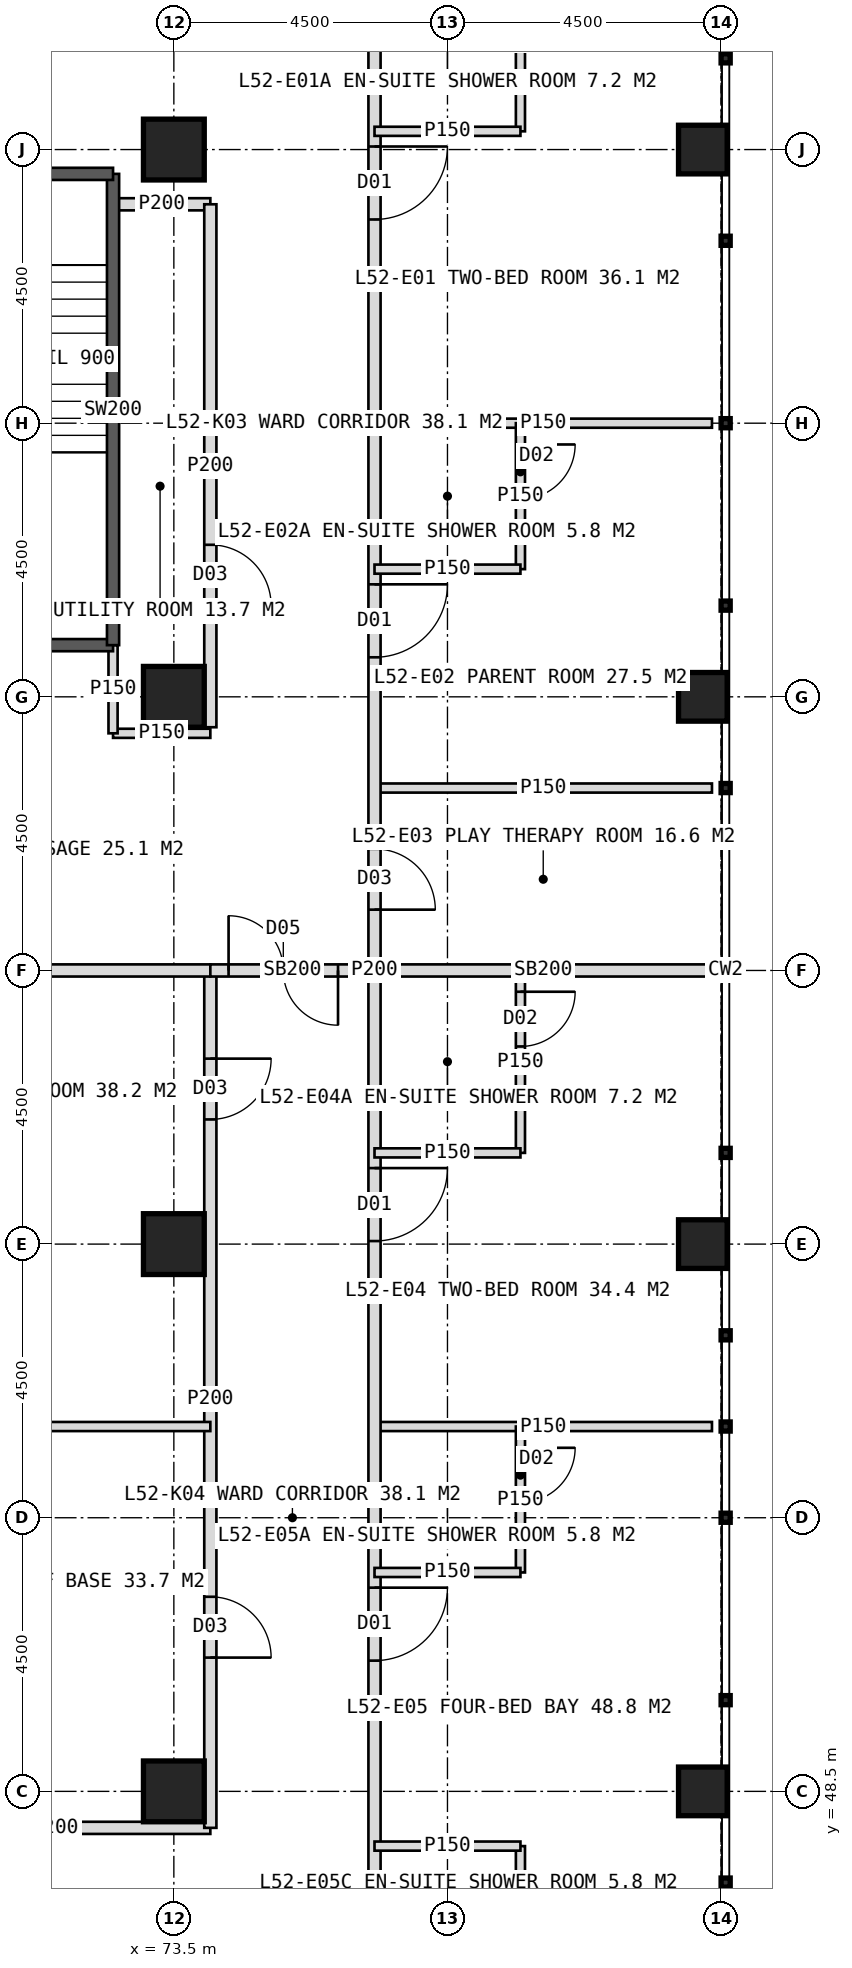
"""IFC4 building model, lengths in metres.
Left out: names, types, materials, properties, quantities, classifications, styles, units other than length and angle.
Written with IfcOpenShell. Run it as: python <this file> out.ifc"""

import sys

from ifc_helpers import new_model, si_unit, direction, frame, frame_2d, origin, origin_2d, place, context, subcontext, project, spatial, rectangle, hollow_rectangle, extrude, element, fill, save


model = new_model("IFC4")
c1 = context("Model", 3, precision=1e-05, world=origin(), true_north=direction((0.0, 1.0)))
c2 = subcontext(c1, "Body", "Model", "MODEL_VIEW")
j1 = project(units=[si_unit("LENGTHUNIT", "METRE"), si_unit("PLANEANGLEUNIT", "RADIAN")], contexts=[c1])
p1 = place(None, origin())
s1 = spatial("IfcSite", under=j1, at=p1, CompositionType="ELEMENT")
p2 = place(p1, origin())
s2 = spatial("IfcBuilding", under=s1, at=p2, CompositionType="ELEMENT")
p3 = place(p2, frame((0.0, 0.0, 217.0)))
s3 = spatial("IfcBuildingStorey", under=s2, at=p3, CompositionType="ELEMENT", Elevation=217.0)
for number, where, z_axis, x_axis in (
    (1, (73.5, 48.5, 0.0), (0.0, 0.0, 1.0), (1.0, 0.0, 0.0)),
    (2, (73.5, 75.5, 0.0), (0.0, 0.0, 1.0), (1.0, 0.0, 0.0)),
    (3, (73.5, 57.5, 0.0), (0.0, 0.0, 1.0), (1.0, 0.0, 0.0)),
    (4, (73.5, 66.5, 0.0), (0.0, 0.0, 1.0), (1.0, 0.0, 0.0)),
):
    element("IfcColumn", number, at=place(p3, frame(where, z_axis=z_axis, x_axis=x_axis)), inside=s3, PredefinedType="COLUMN", context=c2, shape_type="SweptSolid", body=[
        extrude(hollow_rectangle(XDim=1.0, YDim=1.0, WallThickness=0.1, at=origin_2d()), origin(), (0.0, 0.0, 1.0), 4.0),
    ])
for number, where, z_axis, x_axis in (
    (5, (82.2, 48.5, 0.0), (0.0, 0.0, 1.0), (1.0, 0.0, 0.0)),
    (6, (82.2, 57.5, 0.0), (0.0, 0.0, 1.0), (1.0, 0.0, 0.0)),
    (7, (82.2, 66.5, 0.0), (0.0, 0.0, 1.0), (1.0, 0.0, 0.0)),
    (8, (82.2, 75.5, 0.0), (0.0, 0.0, 1.0), (1.0, 0.0, 0.0)),
):
    element("IfcColumn", number, at=place(p3, frame(where, z_axis=z_axis, x_axis=x_axis)), inside=s3, PredefinedType="COLUMN", context=c2, shape_type="SweptSolid", body=[
        extrude(hollow_rectangle(XDim=0.8, YDim=0.8, WallThickness=0.08, at=origin_2d()), origin(), (0.0, 0.0, 1.0), 4.0),
    ])
p4 = place(p3, frame((72.5, 74.6, 0.0), z_axis=(0.0, 0.0, 1.0), x_axis=(1.0, 0.0, 0.0)))
e9 = element("IfcWall", 9, at=p4, inside=s3, PredefinedType="PARTITIONING", context=c2, shape_type="SweptSolid", body=[
    extrude(rectangle(XDim=1.6, YDim=0.2, at=frame_2d((0.8, 0.0))), origin(), (0.0, 0.0, 1.0), 3.75),
])
p5 = place(p3, frame((74.1, 47.9, 0.0), z_axis=(0.0, 0.0, 1.0), x_axis=(-1.0, 0.0, 0.0)))
e10 = element("IfcWall", 10, at=p5, inside=s3, PredefinedType="PARTITIONING", context=c2, shape_type="SweptSolid", body=[
    extrude(rectangle(XDim=5.1, YDim=0.2, at=frame_2d((2.55, 0.0))), origin(), (0.0, 0.0, 1.0), 3.75),
])
for number, where, z_axis, x_axis in (
    (11, (76.8, 71.0, 0.0), (0.0, 0.0, 1.0), (1.0, 0.0, 0.0)),
    (12, (76.8, 65.0, 0.0), (0.0, 0.0, 1.0), (1.0, 0.0, 0.0)),
):
    element("IfcWall", number, at=place(p3, frame(where, z_axis=z_axis, x_axis=x_axis)), inside=s3, PredefinedType="PARTITIONING", context=c2, shape_type="SweptSolid", body=[
        extrude(rectangle(XDim=5.55, YDim=0.15, at=frame_2d((2.775, 0.0))), origin(), (0.0, 0.0, 1.0), 3.75),
    ])
p6 = place(p3, frame((76.8, 62.0, 0.0), z_axis=(0.0, 0.0, 1.0), x_axis=(1.0, 0.0, 0.0)))
e13 = element("IfcWall", 13, at=p6, inside=s3, PredefinedType="SOLIDWALL", context=c2, shape_type="SweptSolid", body=[
    extrude(rectangle(XDim=5.55, YDim=0.2, at=frame_2d((2.775, 0.0))), origin(), (0.0, 0.0, 1.0), 2.95),
])
p7 = place(p3, frame((76.8, 54.5, 0.0), z_axis=(0.0, 0.0, 1.0), x_axis=(1.0, 0.0, 0.0)))
e14 = element("IfcWall", 14, at=p7, inside=s3, PredefinedType="PARTITIONING", context=c2, shape_type="SweptSolid", body=[
    extrude(rectangle(XDim=5.55, YDim=0.15, at=frame_2d((2.775, 0.0))), origin(), (0.0, 0.0, 1.0), 3.75),
])
p8 = place(p3, frame((76.8, 78.8, 0.0), z_axis=(0.0, 0.0, 1.0), x_axis=(0.0, -1.0, 0.0)))
e15 = element("IfcWall", 15, at=p8, inside=s3, PredefinedType="PARTITIONING", context=c2, shape_type="SweptSolid", body=[
    extrude(rectangle(XDim=33.6, YDim=0.2, at=frame_2d((16.8, 0.0))), origin(), (0.0, 0.0, 1.0), 3.75),
])
p9 = place(p8, frame((3.25, 0.0, 0.0)))
e16 = element("IfcOpeningElement", 16, at=p9, cuts=e15, PredefinedType="OPENING", context=c2, shape_type="SweptSolid", body=[
    extrude(rectangle(XDim=1.2, YDim=2.2, at=frame_2d((0.6, 1.1))), frame((0.0, 0.11, 0.0), z_axis=(0.0, -1.0, 0.0), x_axis=(1.0, 0.0, 0.0)), (0.0, 0.0, 1.0), 0.22),
])
p10 = place(p8, frame((10.45, 0.0, 0.0)))
e17 = element("IfcOpeningElement", 17, at=p10, cuts=e15, PredefinedType="OPENING", context=c2, shape_type="SweptSolid", body=[
    extrude(rectangle(XDim=1.2, YDim=2.2, at=frame_2d((0.6, 1.1))), frame((0.0, 0.11, 0.0), z_axis=(0.0, -1.0, 0.0), x_axis=(1.0, 0.0, 0.0)), (0.0, 0.0, 1.0), 0.22),
])
p11 = place(p8, frame((14.8, 0.0, 0.0)))
e18 = element("IfcOpeningElement", 18, at=p11, cuts=e15, PredefinedType="OPENING", context=c2, shape_type="SweptSolid", body=[
    extrude(rectangle(XDim=1.0, YDim=2.1, at=frame_2d((0.5, 1.05))), frame((0.0, 0.11, 0.0), z_axis=(0.0, -1.0, 0.0), x_axis=(1.0, 0.0, 0.0)), (0.0, 0.0, 1.0), 0.22),
])
p12 = place(p8, frame((20.05, 0.0, 0.0)))
e19 = element("IfcOpeningElement", 19, at=p12, cuts=e15, PredefinedType="OPENING", context=c2, shape_type="SweptSolid", body=[
    extrude(rectangle(XDim=1.2, YDim=2.2, at=frame_2d((0.6, 1.1))), frame((0.0, 0.11, 0.0), z_axis=(0.0, -1.0, 0.0), x_axis=(1.0, 0.0, 0.0)), (0.0, 0.0, 1.0), 0.22),
])
p13 = place(p8, frame((26.95, 0.0, 0.0)))
e20 = element("IfcOpeningElement", 20, at=p13, cuts=e15, PredefinedType="OPENING", context=c2, shape_type="SweptSolid", body=[
    extrude(rectangle(XDim=1.2, YDim=2.2, at=frame_2d((0.6, 1.1))), frame((0.0, 0.11, 0.0), z_axis=(0.0, -1.0, 0.0), x_axis=(1.0, 0.0, 0.0)), (0.0, 0.0, 1.0), 0.22),
])
p14 = place(p3, frame((79.2, 78.8, 0.0), z_axis=(0.0, 0.0, 1.0), x_axis=(0.0, -1.0, 0.0)))
e21 = element("IfcWall", 21, at=p14, inside=s3, PredefinedType="PARTITIONING", context=c2, shape_type="SweptSolid", body=[
    extrude(rectangle(XDim=3.0, YDim=0.15, at=frame_2d((1.5, 0.0))), origin(), (0.0, 0.0, 1.0), 3.75),
])
p15 = place(p14, frame((0.35, 0.0, 0.0)))
e22 = element("IfcOpeningElement", 22, at=p15, cuts=e21, PredefinedType="OPENING", context=c2, shape_type="SweptSolid", body=[
    extrude(rectangle(XDim=0.9, YDim=2.1, at=frame_2d((0.45, 1.05))), frame((0.0, 0.085, 0.0), z_axis=(0.0, -1.0, 0.0), x_axis=(1.0, 0.0, 0.0)), (0.0, 0.0, 1.0), 0.17),
])
p16 = place(p3, frame((76.8, 75.8, 0.0), z_axis=(0.0, 0.0, 1.0), x_axis=(1.0, 0.0, 0.0)))
e23 = element("IfcWall", 23, at=p16, inside=s3, PredefinedType="PARTITIONING", context=c2, shape_type="SweptSolid", body=[
    extrude(rectangle(XDim=2.4, YDim=0.15, at=frame_2d((1.2, 0.0))), origin(), (0.0, 0.0, 1.0), 3.75),
])
p17 = place(p3, frame((79.2, 71.0, 0.0), z_axis=(0.0, 0.0, 1.0), x_axis=(0.0, -1.0, 0.0)))
e24 = element("IfcWall", 24, at=p17, inside=s3, PredefinedType="PARTITIONING", context=c2, shape_type="SweptSolid", body=[
    extrude(rectangle(XDim=2.4, YDim=0.15, at=frame_2d((1.2, 0.0))), origin(), (0.0, 0.0, 1.0), 3.75),
])
p18 = place(p17, frame((0.35, 0.0, 0.0)))
e25 = element("IfcOpeningElement", 25, at=p18, cuts=e24, PredefinedType="OPENING", context=c2, shape_type="SweptSolid", body=[
    extrude(rectangle(XDim=0.9, YDim=2.1, at=frame_2d((0.45, 1.05))), frame((0.0, 0.085, 0.0), z_axis=(0.0, -1.0, 0.0), x_axis=(1.0, 0.0, 0.0)), (0.0, 0.0, 1.0), 0.17),
])
p19 = place(p3, frame((76.8, 68.6, 0.0), z_axis=(0.0, 0.0, 1.0), x_axis=(1.0, 0.0, 0.0)))
e26 = element("IfcWall", 26, at=p19, inside=s3, PredefinedType="PARTITIONING", context=c2, shape_type="SweptSolid", body=[
    extrude(rectangle(XDim=2.4, YDim=0.15, at=frame_2d((1.2, 0.0))), origin(), (0.0, 0.0, 1.0), 3.75),
])
p20 = place(p3, frame((79.2, 62.0, 0.0), z_axis=(0.0, 0.0, 1.0), x_axis=(0.0, -1.0, 0.0)))
e27 = element("IfcWall", 27, at=p20, inside=s3, PredefinedType="PARTITIONING", context=c2, shape_type="SweptSolid", body=[
    extrude(rectangle(XDim=3.0, YDim=0.15, at=frame_2d((1.5, 0.0))), origin(), (0.0, 0.0, 1.0), 3.75),
])
p21 = place(p20, frame((0.35, 0.0, 0.0)))
e28 = element("IfcOpeningElement", 28, at=p21, cuts=e27, PredefinedType="OPENING", context=c2, shape_type="SweptSolid", body=[
    extrude(rectangle(XDim=0.9, YDim=2.1, at=frame_2d((0.45, 1.05))), frame((0.0, 0.085, 0.0), z_axis=(0.0, -1.0, 0.0), x_axis=(1.0, 0.0, 0.0)), (0.0, 0.0, 1.0), 0.17),
])
p22 = place(p3, frame((76.8, 59.0, 0.0), z_axis=(0.0, 0.0, 1.0), x_axis=(1.0, 0.0, 0.0)))
e29 = element("IfcWall", 29, at=p22, inside=s3, PredefinedType="PARTITIONING", context=c2, shape_type="SweptSolid", body=[
    extrude(rectangle(XDim=2.4, YDim=0.15, at=frame_2d((1.2, 0.0))), origin(), (0.0, 0.0, 1.0), 3.75),
])
p23 = place(p3, frame((79.2, 54.5, 0.0), z_axis=(0.0, 0.0, 1.0), x_axis=(0.0, -1.0, 0.0)))
e30 = element("IfcWall", 30, at=p23, inside=s3, PredefinedType="PARTITIONING", context=c2, shape_type="SweptSolid", body=[
    extrude(rectangle(XDim=2.4, YDim=0.15, at=frame_2d((1.2, 0.0))), origin(), (0.0, 0.0, 1.0), 3.75),
])
p24 = place(p23, frame((0.35, 0.0, 0.0)))
e31 = element("IfcOpeningElement", 31, at=p24, cuts=e30, PredefinedType="OPENING", context=c2, shape_type="SweptSolid", body=[
    extrude(rectangle(XDim=0.9, YDim=2.1, at=frame_2d((0.45, 1.05))), frame((0.0, 0.085, 0.0), z_axis=(0.0, -1.0, 0.0), x_axis=(1.0, 0.0, 0.0)), (0.0, 0.0, 1.0), 0.17),
])
p25 = place(p3, frame((76.8, 52.1, 0.0), z_axis=(0.0, 0.0, 1.0), x_axis=(1.0, 0.0, 0.0)))
e32 = element("IfcWall", 32, at=p25, inside=s3, PredefinedType="PARTITIONING", context=c2, shape_type="SweptSolid", body=[
    extrude(rectangle(XDim=2.4, YDim=0.15, at=frame_2d((1.2, 0.0))), origin(), (0.0, 0.0, 1.0), 3.75),
])
p26 = place(p3, frame((79.2, 47.6, 0.0), z_axis=(0.0, 0.0, 1.0), x_axis=(0.0, -1.0, 0.0)))
e33 = element("IfcWall", 33, at=p26, inside=s3, PredefinedType="PARTITIONING", context=c2, shape_type="SweptSolid", body=[
    extrude(rectangle(XDim=2.4, YDim=0.15, at=frame_2d((1.2, 0.0))), origin(), (0.0, 0.0, 1.0), 3.75),
])
p27 = place(p26, frame((1.15, 0.0, 0.0)))
e34 = element("IfcOpeningElement", 34, at=p27, cuts=e33, PredefinedType="OPENING", context=c2, shape_type="SweptSolid", body=[
    extrude(rectangle(XDim=0.9, YDim=2.1, at=frame_2d((0.45, 1.05))), frame((0.0, 0.085, 0.0), z_axis=(0.0, -1.0, 0.0), x_axis=(1.0, 0.0, 0.0)), (0.0, 0.0, 1.0), 0.17),
])
p28 = place(p3, frame((76.8, 47.6, 0.0), z_axis=(0.0, 0.0, 1.0), x_axis=(1.0, 0.0, 0.0)))
e35 = element("IfcWall", 35, at=p28, inside=s3, PredefinedType="PARTITIONING", context=c2, shape_type="SweptSolid", body=[
    extrude(rectangle(XDim=2.4, YDim=0.15, at=frame_2d((1.2, 0.0))), origin(), (0.0, 0.0, 1.0), 3.75),
])
p29 = place(p3, frame((74.1, 74.6, 0.0), z_axis=(0.0, 0.0, 1.0), x_axis=(0.0, -1.0, 0.0)))
e36 = element("IfcWall", 36, at=p29, inside=s3, PredefinedType="PARTITIONING", context=c2, shape_type="SweptSolid", body=[
    extrude(rectangle(XDim=8.6, YDim=0.2, at=frame_2d((4.3, 0.0))), origin(), (0.0, 0.0, 1.0), 3.75),
])
p30 = place(p29, frame((5.6, 0.0, 0.0)))
e37 = element("IfcOpeningElement", 37, at=p30, cuts=e36, PredefinedType="OPENING", context=c2, shape_type="SweptSolid", body=[
    extrude(rectangle(XDim=1.0, YDim=2.1, at=frame_2d((0.5, 1.05))), frame((0.0, 0.11, 0.0), z_axis=(0.0, -1.0, 0.0), x_axis=(1.0, 0.0, 0.0)), (0.0, 0.0, 1.0), 0.22),
])
p31 = place(p3, frame((74.1, 62.0, 0.0), z_axis=(0.0, 0.0, 1.0), x_axis=(0.0, -1.0, 0.0)))
e38 = element("IfcWall", 38, at=p31, inside=s3, PredefinedType="PARTITIONING", context=c2, shape_type="SweptSolid", body=[
    extrude(rectangle(XDim=14.1, YDim=0.2, at=frame_2d((7.05, 0.0))), origin(), (0.0, 0.0, 1.0), 3.75),
])
p32 = place(p31, frame((1.45, 0.0, 0.0)))
e39 = element("IfcOpeningElement", 39, at=p32, cuts=e38, PredefinedType="OPENING", context=c2, shape_type="SweptSolid", body=[
    extrude(rectangle(XDim=1.0, YDim=2.1, at=frame_2d((0.5, 1.05))), frame((0.0, 0.11, 0.0), z_axis=(0.0, -1.0, 0.0), x_axis=(1.0, 0.0, 0.0)), (0.0, 0.0, 1.0), 0.22),
])
p33 = place(p31, frame((10.3, 0.0, 0.0)))
e40 = element("IfcOpeningElement", 40, at=p33, cuts=e38, PredefinedType="OPENING", context=c2, shape_type="SweptSolid", body=[
    extrude(rectangle(XDim=1.0, YDim=2.1, at=frame_2d((0.5, 1.05))), frame((0.0, 0.11, 0.0), z_axis=(0.0, -1.0, 0.0), x_axis=(1.0, 0.0, 0.0)), (0.0, 0.0, 1.0), 0.22),
])
p34 = place(p3, frame((72.5, 65.9, 0.0), z_axis=(0.0, 0.0, 1.0), x_axis=(1.0, 0.0, 0.0)))
e41 = element("IfcWall", 41, at=p34, inside=s3, PredefinedType="PARTITIONING", context=c2, shape_type="SweptSolid", body=[
    extrude(rectangle(XDim=1.6, YDim=0.15, at=frame_2d((0.8, 0.0))), origin(), (0.0, 0.0, 1.0), 3.75),
])
p35 = place(p3, frame((69.0, 62.0, 0.0), z_axis=(0.0, 0.0, 1.0), x_axis=(1.0, 0.0, 0.0)))
e42 = element("IfcWall", 42, at=p35, inside=s3, PredefinedType="SOLIDWALL", context=c2, shape_type="SweptSolid", body=[
    extrude(rectangle(XDim=5.1, YDim=0.2, at=frame_2d((2.55, 0.0))), origin(), (0.0, 0.0, 1.0), 2.95),
])
p36 = place(p3, frame((69.0, 54.5, 0.0), z_axis=(0.0, 0.0, 1.0), x_axis=(1.0, 0.0, 0.0)))
e43 = element("IfcWall", 43, at=p36, inside=s3, PredefinedType="PARTITIONING", context=c2, shape_type="SweptSolid", body=[
    extrude(rectangle(XDim=5.1, YDim=0.15, at=frame_2d((2.55, 0.0))), origin(), (0.0, 0.0, 1.0), 3.75),
])
p37 = place(p3, frame((74.1, 62.0, 0.0), z_axis=(0.0, 0.0, 1.0), x_axis=(1.0, 0.0, 0.0)))
e44 = element("IfcWall", 44, at=p37, inside=s3, PredefinedType="SOLIDWALL", context=c2, shape_type="SweptSolid", body=[
    extrude(rectangle(XDim=2.7, YDim=0.2, at=frame_2d((1.35, 0.0))), origin(), (0.0, 0.0, 1.0), 2.95),
])
p38 = place(p37, frame((0.3, 0.0, 0.0)))
e45 = element("IfcOpeningElement", 45, at=p38, cuts=e44, PredefinedType="OPENING", context=c2, shape_type="SweptSolid", body=[
    extrude(rectangle(XDim=1.8, YDim=2.2, at=frame_2d((0.9, 1.1))), frame((0.0, 0.11, 0.0), z_axis=(0.0, -1.0, 0.0), x_axis=(1.0, 0.0, 0.0)), (0.0, 0.0, 1.0), 0.22),
])
p39 = place(p3, frame((72.5, 65.9, 0.0), z_axis=(0.0, 0.0, 1.0), x_axis=(0.0, 1.0, 0.0)))
e46 = element("IfcWall", 46, at=p39, inside=s3, PredefinedType="PARTITIONING", context=c2, shape_type="SweptSolid", body=[
    extrude(rectangle(XDim=1.45, YDim=0.15, at=frame_2d((0.725, 0.0))), origin(), (0.0, 0.0, 1.0), 3.75),
])
p40 = place(p3, frame((69.0, 67.35, 0.0), z_axis=(0.0, 0.0, 1.0), x_axis=(1.0, 0.0, 0.0)))
e47 = element("IfcWall", 47, at=p40, inside=s3, PredefinedType="SOLIDWALL", context=c2, shape_type="SweptSolid", body=[
    extrude(rectangle(XDim=3.5, YDim=0.2, at=frame_2d((1.75, 0.0))), origin(), (0.0, 0.0, 1.0), 3.75),
])
p41 = place(p3, frame((72.5, 67.35, 0.0), z_axis=(0.0, 0.0, 1.0), x_axis=(0.0, 1.0, 0.0)))
e48 = element("IfcWall", 48, at=p41, inside=s3, PredefinedType="SOLIDWALL", context=c2, shape_type="SweptSolid", body=[
    extrude(rectangle(XDim=7.75, YDim=0.2, at=frame_2d((3.875, 0.0))), origin(), (0.0, 0.0, 1.0), 3.75),
])
p42 = place(p3, frame((69.0, 75.1, 0.0), z_axis=(0.0, 0.0, 1.0), x_axis=(1.0, 0.0, 0.0)))
e49 = element("IfcWall", 49, at=p42, inside=s3, PredefinedType="SOLIDWALL", context=c2, shape_type="SweptSolid", body=[
    extrude(rectangle(XDim=3.5, YDim=0.2, at=frame_2d((1.75, 0.0))), origin(), (0.0, 0.0, 1.0), 3.75),
])
p43 = place(p42, frame((1.15, 0.0, 0.0)))
e50 = element("IfcOpeningElement", 50, at=p43, cuts=e49, PredefinedType="OPENING", context=c2, shape_type="SweptSolid", body=[
    extrude(rectangle(XDim=1.2, YDim=2.1, at=frame_2d((0.6, 1.05))), frame((0.0, 0.11, 0.0), z_axis=(0.0, -1.0, 0.0), x_axis=(1.0, 0.0, 0.0)), (0.0, 0.0, 1.0), 0.22),
])
p44 = place(p9, origin())
e51 = element("IfcDoor", 51, at=p44, inside=s3, OperationType="SINGLE_SWING_LEFT", PredefinedType="DOOR", context=c2, shape_type="SweptSolid", body=[
    extrude(rectangle(XDim=1.2, YDim=2.2, at=frame_2d((0.6, 1.1))), frame((0.0, 0.025, 0.0), z_axis=(0.0, -1.0, 0.0), x_axis=(1.0, 0.0, 0.0)), (0.0, 0.0, 1.0), 0.05),
])
fill(e16, e51)
p45 = place(p10, origin())
e52 = element("IfcDoor", 52, at=p45, inside=s3, OperationType="SINGLE_SWING_LEFT", PredefinedType="DOOR", context=c2, shape_type="SweptSolid", body=[
    extrude(rectangle(XDim=1.2, YDim=2.2, at=frame_2d((0.6, 1.1))), frame((0.0, 0.025, 0.0), z_axis=(0.0, -1.0, 0.0), x_axis=(1.0, 0.0, 0.0)), (0.0, 0.0, 1.0), 0.05),
])
fill(e17, e52)
p46 = place(p18, origin())
e53 = element("IfcDoor", 53, at=p46, inside=s3, OperationType="SINGLE_SWING_LEFT", PredefinedType="DOOR", context=c2, shape_type="SweptSolid", body=[
    extrude(rectangle(XDim=0.9, YDim=2.1, at=frame_2d((0.45, 1.05))), frame((0.0, 0.025, 0.0), z_axis=(0.0, -1.0, 0.0), x_axis=(1.0, 0.0, 0.0)), (0.0, 0.0, 1.0), 0.05),
])
fill(e25, e53)
p47 = place(p11, origin())
e54 = element("IfcDoor", 54, at=p47, inside=s3, OperationType="SINGLE_SWING_RIGHT", PredefinedType="DOOR", context=c2, shape_type="SweptSolid", body=[
    extrude(rectangle(XDim=1.0, YDim=2.1, at=frame_2d((0.5, 1.05))), frame((0.0, 0.025, 0.0), z_axis=(0.0, -1.0, 0.0), x_axis=(1.0, 0.0, 0.0)), (0.0, 0.0, 1.0), 0.05),
])
fill(e18, e54)
p48 = place(p12, origin())
e55 = element("IfcDoor", 55, at=p48, inside=s3, OperationType="SINGLE_SWING_LEFT", PredefinedType="DOOR", context=c2, shape_type="SweptSolid", body=[
    extrude(rectangle(XDim=1.2, YDim=2.2, at=frame_2d((0.6, 1.1))), frame((0.0, 0.025, 0.0), z_axis=(0.0, -1.0, 0.0), x_axis=(1.0, 0.0, 0.0)), (0.0, 0.0, 1.0), 0.05),
])
fill(e19, e55)
p49 = place(p21, origin())
e56 = element("IfcDoor", 56, at=p49, inside=s3, OperationType="SINGLE_SWING_LEFT", PredefinedType="DOOR", context=c2, shape_type="SweptSolid", body=[
    extrude(rectangle(XDim=0.9, YDim=2.1, at=frame_2d((0.45, 1.05))), frame((0.0, 0.025, 0.0), z_axis=(0.0, -1.0, 0.0), x_axis=(1.0, 0.0, 0.0)), (0.0, 0.0, 1.0), 0.05),
])
fill(e28, e56)
p50 = place(p13, origin())
e57 = element("IfcDoor", 57, at=p50, inside=s3, OperationType="SINGLE_SWING_LEFT", PredefinedType="DOOR", context=c2, shape_type="SweptSolid", body=[
    extrude(rectangle(XDim=1.2, YDim=2.2, at=frame_2d((0.6, 1.1))), frame((0.0, 0.025, 0.0), z_axis=(0.0, -1.0, 0.0), x_axis=(1.0, 0.0, 0.0)), (0.0, 0.0, 1.0), 0.05),
])
fill(e20, e57)
p51 = place(p24, origin())
e58 = element("IfcDoor", 58, at=p51, inside=s3, OperationType="SINGLE_SWING_LEFT", PredefinedType="DOOR", context=c2, shape_type="SweptSolid", body=[
    extrude(rectangle(XDim=0.9, YDim=2.1, at=frame_2d((0.45, 1.05))), frame((0.0, 0.025, 0.0), z_axis=(0.0, -1.0, 0.0), x_axis=(1.0, 0.0, 0.0)), (0.0, 0.0, 1.0), 0.05),
])
fill(e31, e58)
p52 = place(p30, origin())
e59 = element("IfcDoor", 59, at=p52, inside=s3, OperationType="SINGLE_SWING_RIGHT", PredefinedType="DOOR", context=c2, shape_type="SweptSolid", body=[
    extrude(rectangle(XDim=1.0, YDim=2.1, at=frame_2d((0.5, 1.05))), frame((0.0, 0.025, 0.0), z_axis=(0.0, -1.0, 0.0), x_axis=(1.0, 0.0, 0.0)), (0.0, 0.0, 1.0), 0.05),
])
fill(e37, e59)
p53 = place(p32, origin())
e60 = element("IfcDoor", 60, at=p53, inside=s3, OperationType="SINGLE_SWING_LEFT", PredefinedType="DOOR", context=c2, shape_type="SweptSolid", body=[
    extrude(rectangle(XDim=1.0, YDim=2.1, at=frame_2d((0.5, 1.05))), frame((0.0, 0.025, 0.0), z_axis=(0.0, -1.0, 0.0), x_axis=(1.0, 0.0, 0.0)), (0.0, 0.0, 1.0), 0.05),
])
fill(e39, e60)
p54 = place(p33, origin())
e61 = element("IfcDoor", 61, at=p54, inside=s3, OperationType="SINGLE_SWING_RIGHT", PredefinedType="DOOR", context=c2, shape_type="SweptSolid", body=[
    extrude(rectangle(XDim=1.0, YDim=2.1, at=frame_2d((0.5, 1.05))), frame((0.0, 0.025, 0.0), z_axis=(0.0, -1.0, 0.0), x_axis=(1.0, 0.0, 0.0)), (0.0, 0.0, 1.0), 0.05),
])
fill(e40, e61)
p55 = place(p38, origin())
e62 = element("IfcDoor", 62, at=p55, inside=s3, OperationType="DOUBLE_DOOR_DOUBLE_SWING", PredefinedType="DOOR", context=c2, shape_type="SweptSolid", body=[
    extrude(rectangle(XDim=1.8, YDim=2.2, at=frame_2d((0.9, 1.1))), frame((0.0, 0.025, 0.0), z_axis=(0.0, -1.0, 0.0), x_axis=(1.0, 0.0, 0.0)), (0.0, 0.0, 1.0), 0.05),
])
fill(e45, e62)
save(model, sys.argv[1])
